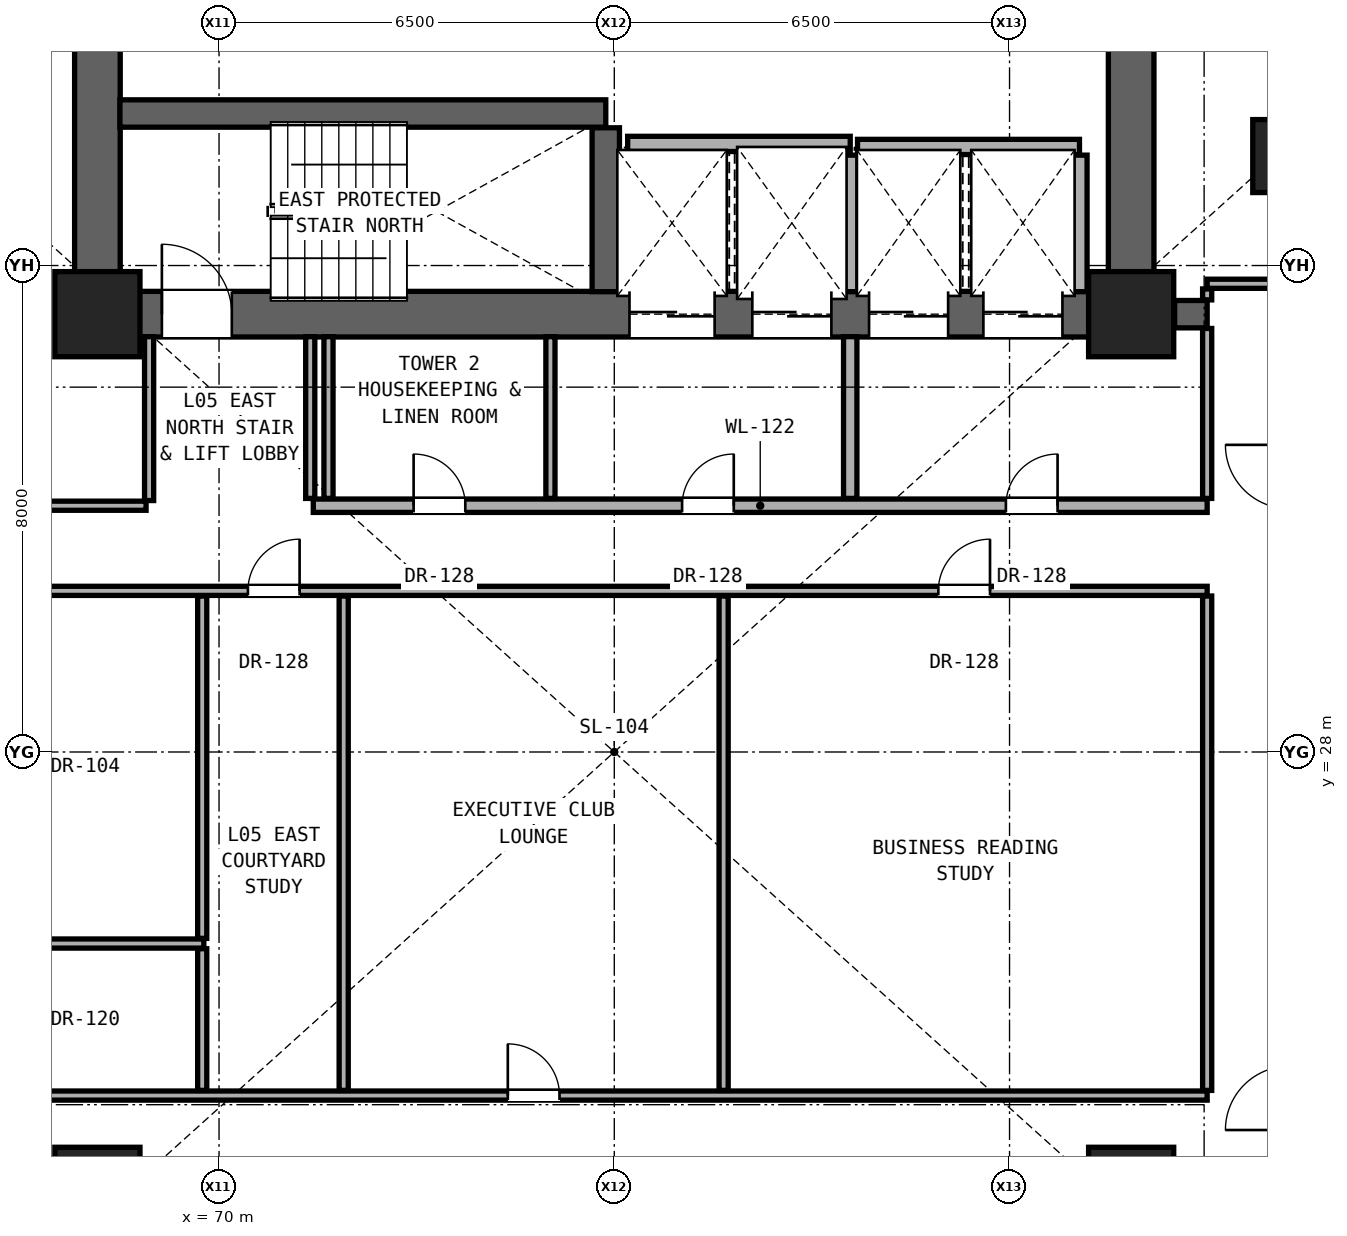
"""IFC4 building model, lengths in metres.
Left out: names, types, materials, properties, quantities, classifications, styles, units other than length and angle.
Written with IfcOpenShell. Run it as: python <this file> out.ifc"""

import sys

from ifc_helpers import new_model, si_unit, direction, frame, frame_2d, origin, origin_2d, place, context, subcontext, project, spatial, rectangle, extrude, element, fill, save


model = new_model("IFC4")
c1 = context("Model", 3, precision=1e-05, world=origin(), true_north=direction((0.0, 1.0)))
c2 = subcontext(c1, "Body", "Model", "MODEL_VIEW")
j1 = project(units=[si_unit("LENGTHUNIT", "METRE"), si_unit("PLANEANGLEUNIT", "RADIAN")], contexts=[c1])
p1 = place(None, origin())
s1 = spatial("IfcSite", under=j1, at=p1, CompositionType="ELEMENT")
p2 = place(p1, origin())
s2 = spatial("IfcBuilding", under=s1, at=p2, CompositionType="ELEMENT")
p3 = place(p2, frame((0.0, 0.0, 22.4)))
s3 = spatial("IfcBuildingStorey", under=s2, at=p3, CompositionType="ELEMENT", Elevation=22.4)
for number, where, z_axis, x_axis in (
    (1, (68.0, 20.8, 0.0), (0.0, 0.0, 1.0), (1.0, 0.0, 0.0)),
    (2, (85.0, 20.8, 0.0), (0.0, 0.0, 1.0), (1.0, 0.0, 0.0)),
    (3, (68.0, 35.2, 0.0), (0.0, 0.0, 1.0), (1.0, 0.0, 0.0)),
    (4, (85.0, 35.2, 0.0), (0.0, 0.0, 1.0), (1.0, 0.0, 0.0)),
):
    element("IfcColumn", number, at=place(p3, frame(where, z_axis=z_axis, x_axis=x_axis)), inside=s3, PredefinedType="COLUMN", context=c2, shape_type="SweptSolid", body=[
        extrude(rectangle(XDim=1.4, YDim=1.4, at=origin_2d()), origin(), (0.0, 0.0, 1.0), 3.3),
    ])
p4 = place(p3, frame((87.4, 37.8, 0.0), z_axis=(0.0, 0.0, 1.0), x_axis=(1.0, 0.0, 0.0)))
e5 = element("IfcColumn", 5, at=p4, inside=s3, PredefinedType="PILASTER", context=c2, shape_type="SweptSolid", body=[
    extrude(rectangle(XDim=0.8, YDim=1.2, at=origin_2d()), origin(), (0.0, 0.0, 1.0), 3.3),
])
for number, where, z_axis, x_axis in (
    (6, (68.0, 35.2, 0.0), (0.0, 0.0, 1.0), (0.0, 1.0, 0.0)),
    (7, (85.0, 35.2, 0.0), (0.0, 0.0, 1.0), (0.0, 1.0, 0.0)),
):
    element("IfcWall", number, at=place(p3, frame(where, z_axis=z_axis, x_axis=x_axis)), inside=s3, PredefinedType="SHEAR", context=c2, shape_type="SweptSolid", body=[
        extrude(rectangle(XDim=5.6, YDim=0.75, at=frame_2d((2.8, 0.0))), origin(), (0.0, 0.0, 1.0), 3.06),
    ])
p5 = place(p3, frame((68.0, 35.2, 0.0), z_axis=(0.0, 0.0, 1.0), x_axis=(1.0, 0.0, 0.0)))
e8 = element("IfcWall", 8, at=p5, inside=s3, PredefinedType="SHEAR", context=c2, shape_type="SweptSolid", body=[
    extrude(rectangle(XDim=17.0, YDim=0.75, at=frame_2d((8.5, 0.0))), origin(), (0.0, 0.0, 1.0), 3.06),
])
p6 = place(p5, frame((1.06, 0.0, 0.0)))
e9 = element("IfcOpeningElement", 9, at=p6, cuts=e8, PredefinedType="OPENING", context=c2, shape_type="SweptSolid", body=[
    extrude(rectangle(XDim=1.15, YDim=2.2, at=frame_2d((0.575, 1.1))), frame((0.0, 0.385, 0.0), z_axis=(0.0, -1.0, 0.0), x_axis=(1.0, 0.0, 0.0)), (0.0, 0.0, 1.0), 0.77),
])
p7 = place(p5, frame((8.75, 0.0, 0.0)))
e10 = element("IfcOpeningElement", 10, at=p7, cuts=e8, PredefinedType="OPENING", context=c2, shape_type="SweptSolid", body=[
    extrude(rectangle(XDim=1.4, YDim=2.35, at=frame_2d((0.7, 1.175))), frame((0.0, 0.385, 0.0), z_axis=(0.0, -1.0, 0.0), x_axis=(1.0, 0.0, 0.0)), (0.0, 0.0, 1.0), 0.77),
])
p8 = place(p5, frame((10.77, 0.0, 0.0)))
e11 = element("IfcOpeningElement", 11, at=p8, cuts=e8, PredefinedType="OPENING", context=c2, shape_type="SweptSolid", body=[
    extrude(rectangle(XDim=1.3, YDim=2.3, at=frame_2d((0.65, 1.15))), frame((0.0, 0.385, 0.0), z_axis=(0.0, -1.0, 0.0), x_axis=(1.0, 0.0, 0.0)), (0.0, 0.0, 1.0), 0.77),
])
p9 = place(p5, frame((12.69, 0.0, 0.0)))
e12 = element("IfcOpeningElement", 12, at=p9, cuts=e8, PredefinedType="OPENING", context=c2, shape_type="SweptSolid", body=[
    extrude(rectangle(XDim=1.3, YDim=2.3, at=frame_2d((0.65, 1.15))), frame((0.0, 0.385, 0.0), z_axis=(0.0, -1.0, 0.0), x_axis=(1.0, 0.0, 0.0)), (0.0, 0.0, 1.0), 0.77),
])
p10 = place(p5, frame((14.57, 0.0, 0.0)))
e13 = element("IfcOpeningElement", 13, at=p10, cuts=e8, PredefinedType="OPENING", context=c2, shape_type="SweptSolid", body=[
    extrude(rectangle(XDim=1.3, YDim=2.3, at=frame_2d((0.65, 1.15))), frame((0.0, 0.385, 0.0), z_axis=(0.0, -1.0, 0.0), x_axis=(1.0, 0.0, 0.0)), (0.0, 0.0, 1.0), 0.77),
])
p11 = place(p3, frame((66.62, 22.35, 0.0), z_axis=(0.0, 0.0, 1.0), x_axis=(1.0, 0.0, 0.0)))
e14 = element("IfcWall", 14, at=p11, inside=s3, PredefinedType="PARTITIONING", context=c2, shape_type="SweptSolid", body=[
    extrude(rectangle(XDim=19.63, YDim=0.15, at=frame_2d((9.815, 0.0))), origin(), (0.0, 0.0, 1.0), 2.125),
])
p12 = place(p11, frame((8.129, 0.0, 0.0)))
e15 = element("IfcOpeningElement", 15, at=p12, cuts=e14, PredefinedType="OPENING", context=c2, shape_type="SweptSolid", body=[
    extrude(rectangle(XDim=0.85, YDim=2.01, at=frame_2d((0.425, 1.005))), frame((0.0, 0.085, 0.0), z_axis=(0.0, -1.0, 0.0), x_axis=(1.0, 0.0, 0.0)), (0.0, 0.0, 1.0), 0.17),
])
p13 = place(p3, frame((66.62, 24.85, 0.0), z_axis=(0.0, 0.0, 1.0), x_axis=(1.0, 0.0, 0.0)))
e16 = element("IfcWall", 16, at=p13, inside=s3, PredefinedType="PARTITIONING", context=c2, shape_type="SweptSolid", body=[
    extrude(rectangle(XDim=3.13, YDim=0.15, at=frame_2d((1.565, 0.0))), origin(), (0.0, 0.0, 1.0), 2.125),
])
p14 = place(p3, frame((66.62, 30.65, 0.0), z_axis=(0.0, 0.0, 1.0), x_axis=(1.0, 0.0, 0.0)))
e17 = element("IfcWall", 17, at=p14, inside=s3, PredefinedType="PARTITIONING", context=c2, shape_type="SweptSolid", body=[
    extrude(rectangle(XDim=19.63, YDim=0.15, at=frame_2d((9.815, 0.0))), origin(), (0.0, 0.0, 1.0), 2.125),
])
p15 = place(p14, frame((3.855, 0.0, 0.0)))
e18 = element("IfcOpeningElement", 18, at=p15, cuts=e17, PredefinedType="OPENING", context=c2, shape_type="SweptSolid", body=[
    extrude(rectangle(XDim=0.85, YDim=2.01, at=frame_2d((0.425, 1.005))), frame((0.0, 0.085, 0.0), z_axis=(0.0, -1.0, 0.0), x_axis=(1.0, 0.0, 0.0)), (0.0, 0.0, 1.0), 0.17),
])
p16 = place(p14, frame((15.209, 0.0, 0.0)))
e19 = element("IfcOpeningElement", 19, at=p16, cuts=e17, PredefinedType="OPENING", context=c2, shape_type="SweptSolid", body=[
    extrude(rectangle(XDim=0.85, YDim=2.01, at=frame_2d((0.425, 1.005))), frame((0.0, 0.085, 0.0), z_axis=(0.0, -1.0, 0.0), x_axis=(1.0, 0.0, 0.0)), (0.0, 0.0, 1.0), 0.17),
])
p17 = place(p3, frame((66.62, 32.05, 0.0), z_axis=(0.0, 0.0, 1.0), x_axis=(1.0, 0.0, 0.0)))
e20 = element("IfcWall", 20, at=p17, inside=s3, PredefinedType="PARTITIONING", context=c2, shape_type="SweptSolid", body=[
    extrude(rectangle(XDim=2.18, YDim=0.15, at=frame_2d((1.09, 0.0))), origin(), (0.0, 0.0, 1.0), 2.125),
])
p18 = place(p3, frame((71.55, 32.05, 0.0), z_axis=(0.0, 0.0, 1.0), x_axis=(1.0, 0.0, 0.0)))
e21 = element("IfcWall", 21, at=p18, inside=s3, PredefinedType="SOLIDWALL", context=c2, shape_type="SweptSolid", body=[
    extrude(rectangle(XDim=14.7, YDim=0.22, at=frame_2d((7.35, 0.0))), origin(), (0.0, 0.0, 1.0), 2.125),
])
p19 = place(p18, frame((11.39, 0.0, 0.0)))
e22 = element("IfcOpeningElement", 22, at=p19, cuts=e21, PredefinedType="OPENING", context=c2, shape_type="SweptSolid", body=[
    extrude(rectangle(XDim=0.85, YDim=2.01, at=frame_2d((0.425, 1.005))), frame((0.0, 0.12, 0.0), z_axis=(0.0, -1.0, 0.0), x_axis=(1.0, 0.0, 0.0)), (0.0, 0.0, 1.0), 0.24),
])
p20 = place(p18, frame((6.065, 0.0, 0.0)))
e23 = element("IfcOpeningElement", 23, at=p20, cuts=e21, PredefinedType="OPENING", context=c2, shape_type="SweptSolid", body=[
    extrude(rectangle(XDim=0.85, YDim=2.01, at=frame_2d((0.425, 1.005))), frame((0.0, 0.12, 0.0), z_axis=(0.0, -1.0, 0.0), x_axis=(1.0, 0.0, 0.0)), (0.0, 0.0, 1.0), 0.24),
])
p21 = place(p18, frame((1.65, 0.0, 0.0)))
e24 = element("IfcOpeningElement", 24, at=p21, cuts=e21, PredefinedType="OPENING", context=c2, shape_type="SweptSolid", body=[
    extrude(rectangle(XDim=0.85, YDim=2.01, at=frame_2d((0.425, 1.005))), frame((0.0, 0.12, 0.0), z_axis=(0.0, -1.0, 0.0), x_axis=(1.0, 0.0, 0.0)), (0.0, 0.0, 1.0), 0.24),
])
p22 = place(p3, frame((85.715, 35.2, 0.0), z_axis=(0.0, 0.0, 1.0), x_axis=(1.0, 0.0, 0.0)))
e25 = element("IfcWall", 25, at=p22, inside=s3, PredefinedType="SHEAR", context=c2, shape_type="SweptSolid", body=[
    extrude(rectangle(XDim=0.535, YDim=0.45, at=frame_2d((0.268, 0.0))), origin(), (0.0, 0.0, 1.0), 3.06),
])
p23 = place(p3, frame((86.25, 35.7, 0.0), z_axis=(0.0, 0.0, 1.0), x_axis=(1.0, 0.0, 0.0)))
e26 = element("IfcWall", 26, at=p23, inside=s3, PredefinedType="PARTITIONING", context=c2, shape_type="SweptSolid", body=[
    extrude(rectangle(XDim=1.35, YDim=0.15, at=frame_2d((0.675, 0.0))), origin(), (0.0, 0.0, 1.0), 3.06),
])
p24 = place(p3, frame((80.5, 37.95, 0.0), z_axis=(0.0, 0.0, 1.0), x_axis=(1.0, 0.0, 0.0)))
e27 = element("IfcWall", 27, at=p24, inside=s3, PredefinedType="SOLIDWALL", context=c2, shape_type="SweptSolid", body=[
    extrude(rectangle(XDim=3.65, YDim=0.25, at=frame_2d((1.825, 0.0))), origin(), (0.0, 0.0, 1.0), 3.06),
])
p25 = place(p3, frame((76.72, 38.0, 0.0), z_axis=(0.0, 0.0, 1.0), x_axis=(1.0, 0.0, 0.0)))
e28 = element("IfcWall", 28, at=p25, inside=s3, PredefinedType="SOLIDWALL", context=c2, shape_type="SweptSolid", body=[
    extrude(rectangle(XDim=3.66, YDim=0.25, at=frame_2d((1.83, 0.0))), origin(), (0.0, 0.0, 1.0), 3.06),
])
p26 = place(p3, frame((68.37, 38.5, 0.0), z_axis=(0.0, 0.0, 1.0), x_axis=(1.0, 0.0, 0.0)))
e29 = element("IfcWall", 29, at=p26, inside=s3, PredefinedType="SHEAR", context=c2, shape_type="SweptSolid", body=[
    extrude(rectangle(XDim=7.99, YDim=0.45, at=frame_2d((3.995, 0.0))), origin(), (0.0, 0.0, 1.0), 3.06),
])
p27 = place(p3, frame((68.85, 32.135, 0.0), z_axis=(0.0, 0.0, 1.0), x_axis=(0.0, 1.0, 0.0)))
e30 = element("IfcWall", 30, at=p27, inside=s3, PredefinedType="PARTITIONING", context=c2, shape_type="SweptSolid", body=[
    extrude(rectangle(XDim=2.695, YDim=0.15, at=frame_2d((1.348, 0.0))), origin(), (0.0, 0.0, 1.0), 3.06),
])
p28 = place(p3, frame((69.723, 22.435, 0.0), z_axis=(0.0, 0.0, 1.0), x_axis=(0.0, 1.0, 0.0)))
e31 = element("IfcWall", 31, at=p28, inside=s3, PredefinedType="PARTITIONING", context=c2, shape_type="SweptSolid", body=[
    extrude(rectangle(XDim=2.33, YDim=0.15, at=frame_2d((1.165, 0.0))), origin(), (0.0, 0.0, 1.0), 3.06),
])
p29 = place(p3, frame((69.723, 24.935, 0.0), z_axis=(0.0, 0.0, 1.0), x_axis=(0.0, 1.0, 0.0)))
e32 = element("IfcWall", 32, at=p29, inside=s3, PredefinedType="PARTITIONING", context=c2, shape_type="SweptSolid", body=[
    extrude(rectangle(XDim=5.63, YDim=0.15, at=frame_2d((2.815, 0.0))), origin(), (0.0, 0.0, 1.0), 2.125),
])
for number, where, z_axis, x_axis in (
    (33, (71.5, 32.17, 0.0), (0.0, 0.0, 1.0), (0.0, 1.0, 0.0)),
    (34, (71.8, 32.17, 0.0), (0.0, 0.0, 1.0), (0.0, 1.0, 0.0)),
):
    element("IfcWall", number, at=place(p3, frame(where, z_axis=z_axis, x_axis=x_axis)), inside=s3, PredefinedType="PARTITIONING", context=c2, shape_type="SweptSolid", body=[
        extrude(rectangle(XDim=2.66, YDim=0.15, at=frame_2d((1.33, 0.0))), origin(), (0.0, 0.0, 1.0), 3.06),
    ])
p30 = place(p3, frame((72.05, 22.435, 0.0), z_axis=(0.0, 0.0, 1.0), x_axis=(0.0, 1.0, 0.0)))
e35 = element("IfcWall", 35, at=p30, inside=s3, PredefinedType="PARTITIONING", context=c2, shape_type="SweptSolid", body=[
    extrude(rectangle(XDim=8.13, YDim=0.15, at=frame_2d((4.065, 0.0))), origin(), (0.0, 0.0, 1.0), 2.125),
])
p31 = place(p3, frame((75.45, 32.17, 0.0), z_axis=(0.0, 0.0, 1.0), x_axis=(0.0, 1.0, 0.0)))
e36 = element("IfcWall", 36, at=p31, inside=s3, PredefinedType="PARTITIONING", context=c2, shape_type="SweptSolid", body=[
    extrude(rectangle(XDim=2.66, YDim=0.15, at=frame_2d((1.33, 0.0))), origin(), (0.0, 0.0, 1.0), 3.06),
])
p32 = place(p3, frame((76.36, 35.57, 0.0), z_axis=(0.0, 0.0, 1.0), x_axis=(0.0, 1.0, 0.0)))
e37 = element("IfcWall", 37, at=p32, inside=s3, PredefinedType="SHEAR", context=c2, shape_type="SweptSolid", body=[
    extrude(rectangle(XDim=2.695, YDim=0.45, at=frame_2d((1.347, 0.0))), origin(), (0.0, 0.0, 1.0), 3.06),
])
p33 = place(p3, frame((78.298, 22.435, 0.0), z_axis=(0.0, 0.0, 1.0), x_axis=(0.0, 1.0, 0.0)))
e38 = element("IfcWall", 38, at=p33, inside=s3, PredefinedType="PARTITIONING", context=c2, shape_type="SweptSolid", body=[
    extrude(rectangle(XDim=8.13, YDim=0.15, at=frame_2d((4.065, 0.0))), origin(), (0.0, 0.0, 1.0), 2.125),
])
p34 = place(p3, frame((80.38, 32.17, 0.0), z_axis=(0.0, 0.0, 1.0), x_axis=(0.0, 1.0, 0.0)))
e39 = element("IfcWall", 39, at=p34, inside=s3, PredefinedType="SOLIDWALL", context=c2, shape_type="SweptSolid", body=[
    extrude(rectangle(XDim=2.66, YDim=0.22, at=frame_2d((1.33, 0.0))), origin(), (0.0, 0.0, 1.0), 3.06),
])
for number, where, z_axis, x_axis in (
    (40, (80.38, 35.57, 0.0), (0.0, 0.0, 1.0), (0.0, 1.0, 0.0)),
    (41, (84.15, 35.57, 0.0), (0.0, 0.0, 1.0), (0.0, 1.0, 0.0)),
):
    element("IfcWall", number, at=place(p3, frame(where, z_axis=z_axis, x_axis=x_axis)), inside=s3, PredefinedType="SOLIDWALL", context=c2, shape_type="SweptSolid", body=[
        extrude(rectangle(XDim=2.245, YDim=0.25, at=frame_2d((1.123, 0.0))), origin(), (0.0, 0.0, 1.0), 3.06),
    ])
p35 = place(p3, frame((86.25, 22.435, 0.0), z_axis=(0.0, 0.0, 1.0), x_axis=(0.0, 1.0, 0.0)))
e42 = element("IfcWall", 42, at=p35, inside=s3, PredefinedType="PARTITIONING", context=c2, shape_type="SweptSolid", body=[
    extrude(rectangle(XDim=8.13, YDim=0.15, at=frame_2d((4.065, 0.0))), origin(), (0.0, 0.0, 1.0), 2.279),
])
p36 = place(p3, frame((86.25, 32.17, 0.0), z_axis=(0.0, 0.0, 1.0), x_axis=(0.0, 1.0, 0.0)))
e43 = element("IfcWall", 43, at=p36, inside=s3, PredefinedType="PARTITIONING", context=c2, shape_type="SweptSolid", body=[
    extrude(rectangle(XDim=2.795, YDim=0.15, at=frame_2d((1.397, 0.0))), origin(), (0.0, 0.0, 1.0), 2.452),
])
p37 = place(p3, frame((86.25, 35.435, 0.0), z_axis=(0.0, 0.0, 1.0), x_axis=(0.0, 1.0, 0.0)))
e44 = element("IfcWall", 44, at=p37, inside=s3, PredefinedType="PARTITIONING", context=c2, shape_type="SweptSolid", body=[
    extrude(rectangle(XDim=0.18, YDim=0.15, at=frame_2d((0.09, 0.0))), origin(), (0.0, 0.0, 1.0), 2.452),
])
p38 = place(p19, origin())
e45 = element("IfcDoor", 45, at=p38, inside=s3, OperationType="SINGLE_SWING_RIGHT", PredefinedType="DOOR", context=c2, shape_type="SweptSolid", body=[
    extrude(rectangle(XDim=0.85, YDim=2.01, at=frame_2d((0.425, 1.005))), frame((0.0, 0.025, 0.0), z_axis=(0.0, -1.0, 0.0), x_axis=(1.0, 0.0, 0.0)), (0.0, 0.0, 1.0), 0.05),
])
fill(e22, e45)
p39 = place(p6, origin())
e46 = element("IfcDoor", 46, at=p39, inside=s3, OperationType="SINGLE_SWING_LEFT", PredefinedType="DOOR", context=c2, shape_type="SweptSolid", body=[
    extrude(rectangle(XDim=1.15, YDim=2.2, at=frame_2d((0.575, 1.1))), frame((0.0, 0.025, 0.0), z_axis=(0.0, -1.0, 0.0), x_axis=(1.0, 0.0, 0.0)), (0.0, 0.0, 1.0), 0.05),
])
fill(e9, e46)
p40 = place(p20, origin())
e47 = element("IfcDoor", 47, at=p40, inside=s3, OperationType="SINGLE_SWING_RIGHT", PredefinedType="DOOR", context=c2, shape_type="SweptSolid", body=[
    extrude(rectangle(XDim=0.85, YDim=2.01, at=frame_2d((0.425, 1.005))), frame((0.0, 0.025, 0.0), z_axis=(0.0, -1.0, 0.0), x_axis=(1.0, 0.0, 0.0)), (0.0, 0.0, 1.0), 0.05),
])
fill(e23, e47)
p41 = place(p21, origin())
e48 = element("IfcDoor", 48, at=p41, inside=s3, OperationType="SINGLE_SWING_LEFT", PredefinedType="DOOR", context=c2, shape_type="SweptSolid", body=[
    extrude(rectangle(XDim=0.85, YDim=2.01, at=frame_2d((0.425, 1.005))), frame((0.0, 0.025, 0.0), z_axis=(0.0, -1.0, 0.0), x_axis=(1.0, 0.0, 0.0)), (0.0, 0.0, 1.0), 0.05),
])
fill(e24, e48)
p42 = place(p15, origin())
e49 = element("IfcDoor", 49, at=p42, inside=s3, OperationType="SINGLE_SWING_RIGHT", PredefinedType="DOOR", context=c2, shape_type="SweptSolid", body=[
    extrude(rectangle(XDim=0.85, YDim=2.01, at=frame_2d((0.425, 1.005))), frame((0.0, 0.025, 0.0), z_axis=(0.0, -1.0, 0.0), x_axis=(1.0, 0.0, 0.0)), (0.0, 0.0, 1.0), 0.05),
])
fill(e18, e49)
p43 = place(p12, origin())
e50 = element("IfcDoor", 50, at=p43, inside=s3, OperationType="SINGLE_SWING_LEFT", PredefinedType="DOOR", context=c2, shape_type="SweptSolid", body=[
    extrude(rectangle(XDim=0.85, YDim=2.01, at=frame_2d((0.425, 1.005))), frame((0.0, 0.025, 0.0), z_axis=(0.0, -1.0, 0.0), x_axis=(1.0, 0.0, 0.0)), (0.0, 0.0, 1.0), 0.05),
])
fill(e15, e50)
p44 = place(p16, origin())
e51 = element("IfcDoor", 51, at=p44, inside=s3, OperationType="SINGLE_SWING_RIGHT", PredefinedType="DOOR", context=c2, shape_type="SweptSolid", body=[
    extrude(rectangle(XDim=0.85, YDim=2.01, at=frame_2d((0.425, 1.005))), frame((0.0, 0.025, 0.0), z_axis=(0.0, -1.0, 0.0), x_axis=(1.0, 0.0, 0.0)), (0.0, 0.0, 1.0), 0.05),
])
fill(e19, e51)
p45 = place(p7, origin())
e52 = element("IfcDoor", 52, at=p45, inside=s3, OperationType="DOUBLE_DOOR_SLIDING", PredefinedType="DOOR", context=c2, shape_type="SweptSolid", body=[
    extrude(rectangle(XDim=1.4, YDim=2.35, at=frame_2d((0.7, 1.175))), frame((0.0, 0.025, 0.0), z_axis=(0.0, -1.0, 0.0), x_axis=(1.0, 0.0, 0.0)), (0.0, 0.0, 1.0), 0.05),
])
fill(e10, e52)
p46 = place(p8, origin())
e53 = element("IfcDoor", 53, at=p46, inside=s3, OperationType="DOUBLE_DOOR_SLIDING", PredefinedType="DOOR", context=c2, shape_type="SweptSolid", body=[
    extrude(rectangle(XDim=1.3, YDim=2.3, at=frame_2d((0.65, 1.15))), frame((0.0, 0.025, 0.0), z_axis=(0.0, -1.0, 0.0), x_axis=(1.0, 0.0, 0.0)), (0.0, 0.0, 1.0), 0.05),
])
fill(e11, e53)
p47 = place(p9, origin())
e54 = element("IfcDoor", 54, at=p47, inside=s3, OperationType="DOUBLE_DOOR_SLIDING", PredefinedType="DOOR", context=c2, shape_type="SweptSolid", body=[
    extrude(rectangle(XDim=1.3, YDim=2.3, at=frame_2d((0.65, 1.15))), frame((0.0, 0.025, 0.0), z_axis=(0.0, -1.0, 0.0), x_axis=(1.0, 0.0, 0.0)), (0.0, 0.0, 1.0), 0.05),
])
fill(e12, e54)
p48 = place(p10, origin())
e55 = element("IfcDoor", 55, at=p48, inside=s3, OperationType="DOUBLE_DOOR_SLIDING", PredefinedType="DOOR", context=c2, shape_type="SweptSolid", body=[
    extrude(rectangle(XDim=1.3, YDim=2.3, at=frame_2d((0.65, 1.15))), frame((0.0, 0.025, 0.0), z_axis=(0.0, -1.0, 0.0), x_axis=(1.0, 0.0, 0.0)), (0.0, 0.0, 1.0), 0.05),
])
fill(e13, e55)
save(model, sys.argv[1])
